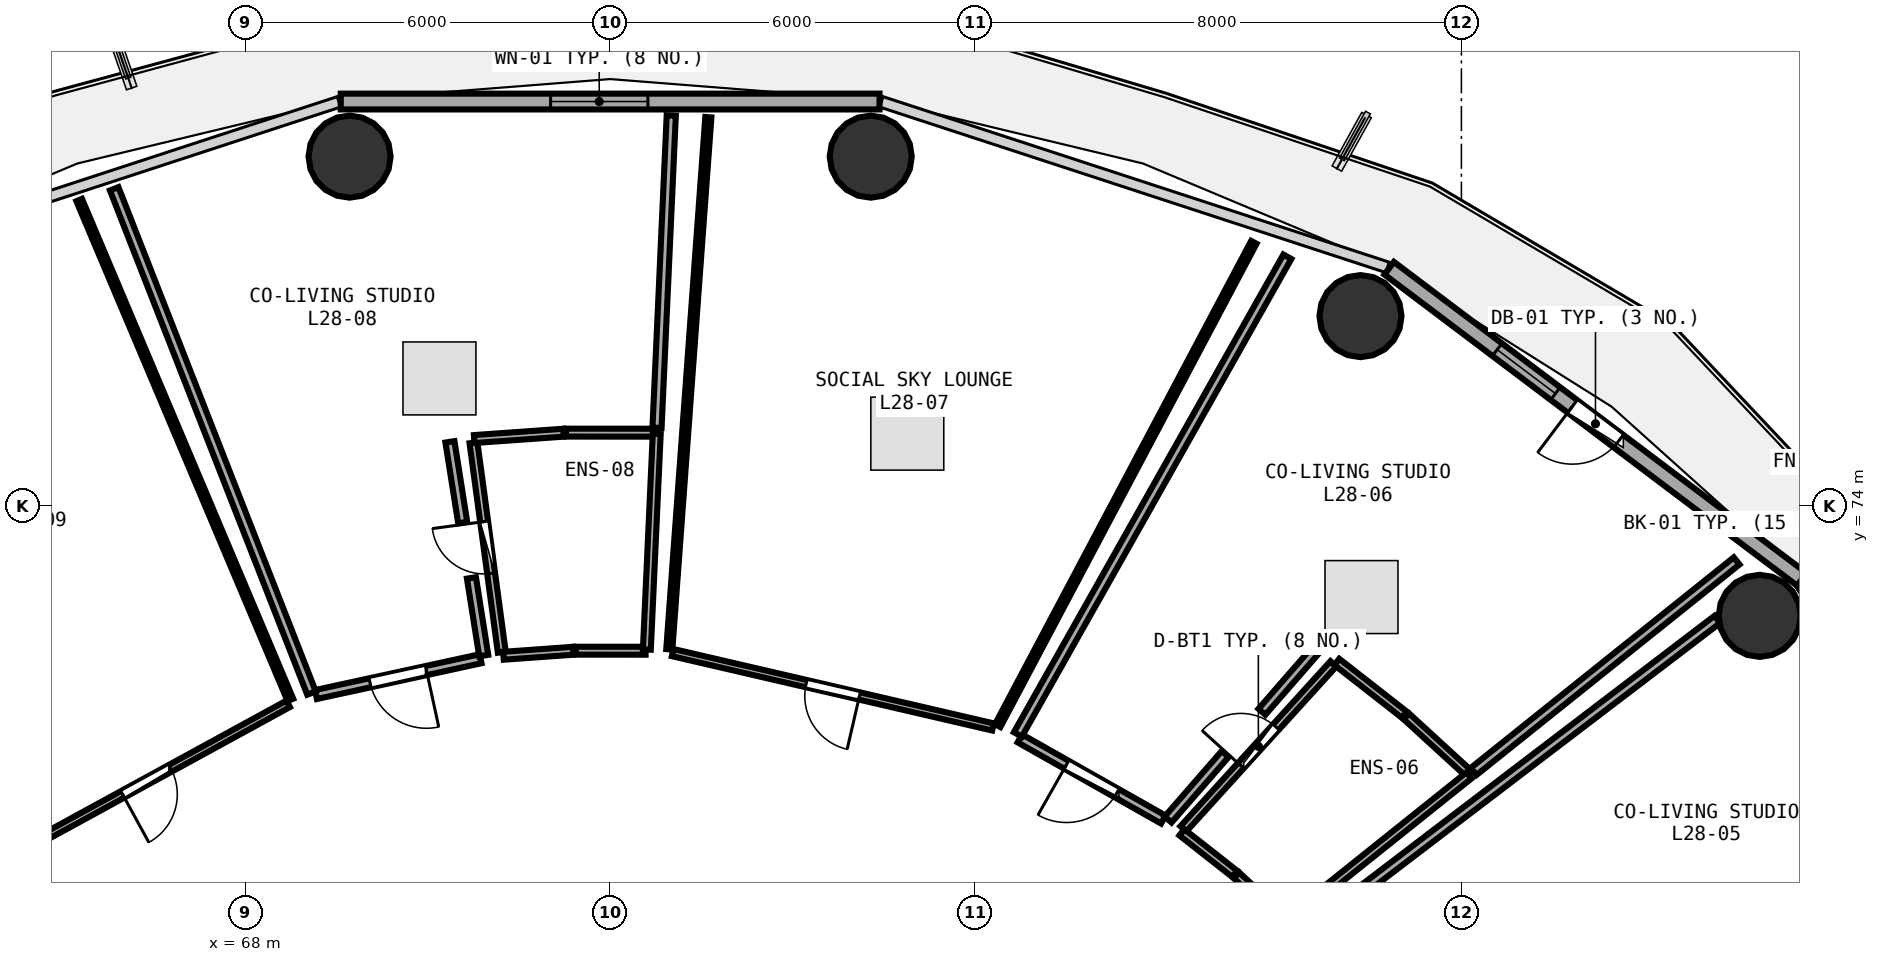
"""IFC4 building model, lengths in metres.
Left out: names, types, materials, properties, quantities, classifications, styles, units other than length and angle.
Written with IfcOpenShell. Run it as: python <this file> out.ifc"""

import sys

from ifc_helpers import new_model, si_unit, direction, frame, frame_2d, origin, origin_2d, place, context, subcontext, project, spatial, rectangle, circle, extrude, element, fill, save


model = new_model("IFC4")
c1 = context("Model", 3, precision=1e-05, world=origin(), true_north=direction((0.0, 1.0)))
c2 = subcontext(c1, "Body", "Model", "MODEL_VIEW")
j1 = project(units=[si_unit("LENGTHUNIT", "METRE"), si_unit("PLANEANGLEUNIT", "RADIAN")], contexts=[c1])
p1 = place(None, origin())
s1 = spatial("IfcSite", under=j1, at=p1, CompositionType="ELEMENT")
p2 = place(p1, origin())
s2 = spatial("IfcBuilding", under=s1, at=p2, CompositionType="ELEMENT")
p3 = place(p2, frame((0.0, 0.0, 110.1)))
s3 = spatial("IfcBuildingStorey", under=s2, at=p3, CompositionType="ELEMENT", Elevation=110.1)
for number, where, z_axis, x_axis in (
    (1, (92.906, 72.193, 0.0), (0.0, 0.0, 1.0), (1.0, 0.0, 0.0)),
    (2, (86.34, 77.122, 0.0), (0.0, 0.0, 1.0), (1.0, 0.0, 0.0)),
    (3, (78.286, 79.745, 0.0), (0.0, 0.0, 1.0), (1.0, 0.0, 0.0)),
    (4, (69.714, 79.745, 0.0), (0.0, 0.0, 1.0), (1.0, 0.0, 0.0)),
):
    element("IfcColumn", number, at=place(p3, frame(where, z_axis=z_axis, x_axis=x_axis)), inside=s3, PredefinedType="COLUMN", context=c2, shape_type="SweptSolid", body=[
        extrude(circle(Radius=0.675, at=origin_2d()), origin(), (0.0, 0.0, 1.0), 3.75),
    ])
p4 = place(p3, frame((98.048, 65.879, 0.0), z_axis=(0.0, 0.0, 1.0), x_axis=(-0.540620528459, 0.841266571432, 0.0)))
e5 = element("IfcWall", 5, at=p4, inside=s3, PredefinedType="SOLIDWALL", context=c2, shape_type="SweptSolid", body=[
    extrude(rectangle(XDim=8.193, YDim=0.26, at=frame_2d((4.096, 0.0))), origin(), (0.0, 0.0, 1.0), 3.475),
])
p5 = place(p4, frame((3.621, 0.0, 0.0)))
e6 = element("IfcOpeningElement", 6, at=p5, cuts=e5, PredefinedType="OPENING", context=c2, shape_type="SweptSolid", body=[
    extrude(rectangle(XDim=0.95, YDim=2.1, at=frame_2d((0.475, 1.05))), frame((0.0, 0.14, 0.0), z_axis=(0.0, -1.0, 0.0), x_axis=(1.0, 0.0, 0.0)), (0.0, 0.0, 1.0), 0.28),
])
p6 = place(p4, frame((4.921, 0.0, 0.85)))
e7 = element("IfcOpeningElement", 7, at=p6, cuts=e5, PredefinedType="OPENING", context=c2, shape_type="SweptSolid", body=[
    extrude(rectangle(XDim=1.2, YDim=1.45, at=frame_2d((0.6, 0.725))), frame((0.0, 0.14, 0.0), z_axis=(0.0, -1.0, 0.0), x_axis=(1.0, 0.0, 0.0)), (0.0, 0.0, 1.0), 0.28),
])
p7 = place(p3, frame((93.599, 72.793, 0.0), z_axis=(0.0, 0.0, 1.0), x_axis=(-0.798501507879, 0.601992808857, 0.0)))
e8 = element("IfcWall", 8, at=p7, inside=s3, PredefinedType="SOLIDWALL", context=c2, shape_type="SweptSolid", body=[
    extrude(rectangle(XDim=8.499, YDim=0.26, at=frame_2d((4.25, 0.0))), origin(), (0.0, 0.0, 1.0), 3.475),
])
p8 = place(p7, frame((3.775, 0.0, 0.0)))
e9 = element("IfcOpeningElement", 9, at=p8, cuts=e8, PredefinedType="OPENING", context=c2, shape_type="SweptSolid", body=[
    extrude(rectangle(XDim=0.95, YDim=2.1, at=frame_2d((0.475, 1.05))), frame((0.0, 0.14, 0.0), z_axis=(0.0, -1.0, 0.0), x_axis=(1.0, 0.0, 0.0)), (0.0, 0.0, 1.0), 0.28),
])
p9 = place(p7, frame((5.075, 0.0, 0.85)))
e10 = element("IfcOpeningElement", 10, at=p9, cuts=e8, PredefinedType="OPENING", context=c2, shape_type="SweptSolid", body=[
    extrude(rectangle(XDim=1.2, YDim=1.45, at=frame_2d((0.6, 0.725))), frame((0.0, 0.14, 0.0), z_axis=(0.0, -1.0, 0.0), x_axis=(1.0, 0.0, 0.0)), (0.0, 0.0, 1.0), 0.28),
])
p10 = place(p3, frame((78.43, 80.651, 0.0), z_axis=(0.0, 0.0, 1.0), x_axis=(-1.0, 0.0, 0.0)))
e11 = element("IfcWall", 11, at=p10, inside=s3, PredefinedType="SOLIDWALL", context=c2, shape_type="SweptSolid", body=[
    extrude(rectangle(XDim=8.861, YDim=0.26, at=frame_2d((4.43, 0.0))), origin(), (0.0, 0.0, 1.0), 3.475),
])
p11 = place(p10, frame((3.81, 0.0, 0.85)))
e12 = element("IfcOpeningElement", 12, at=p11, cuts=e11, PredefinedType="OPENING", context=c2, shape_type="SweptSolid", body=[
    extrude(rectangle(XDim=1.6, YDim=1.45, at=frame_2d((0.8, 0.725))), frame((0.0, 0.14, 0.0), z_axis=(0.0, -1.0, 0.0), x_axis=(1.0, 0.0, 0.0)), (0.0, 0.0, 1.0), 0.28),
])
p12 = place(p3, frame((83.427, 68.689, 0.0), z_axis=(0.0, 0.0, 1.0), x_axis=(0.672623095828, 0.739985250501, 0.0)))
e13 = element("IfcWall", 13, at=p12, inside=s3, PredefinedType="PLUMBINGWALL", context=c2, shape_type="SweptSolid", body=[
    extrude(rectangle(XDim=3.668, YDim=0.13, at=frame_2d((1.834, 0.0))), origin(), (0.0, 0.0, 1.0), 2.925),
])
p13 = place(p12, frame((1.404, 0.0, 0.0)))
e14 = element("IfcOpeningElement", 14, at=p13, cuts=e13, PredefinedType="OPENING", context=c2, shape_type="SweptSolid", body=[
    extrude(rectangle(XDim=0.86, YDim=2.05, at=frame_2d((0.43, 1.025))), frame((0.0, 0.075, 0.0), z_axis=(0.0, -1.0, 0.0), x_axis=(1.0, 0.0, 0.0)), (0.0, 0.0, 1.0), 0.15),
])
p14 = place(p3, frame((83.098, 68.843, 0.0), z_axis=(0.0, 0.0, 1.0), x_axis=(-0.870363179511, 0.492410332702, 0.0)))
e15 = element("IfcWall", 15, at=p14, inside=s3, PredefinedType="PARTITIONING", context=c2, shape_type="SweptSolid", body=[
    extrude(rectangle(XDim=2.711, YDim=0.15, at=frame_2d((1.355, 0.0))), origin(), (0.0, 0.0, 1.0), 2.925),
])
p15 = place(p14, frame((0.881, 0.0, 0.0)))
e16 = element("IfcOpeningElement", 16, at=p15, cuts=e15, PredefinedType="OPENING", context=c2, shape_type="SweptSolid", body=[
    extrude(rectangle(XDim=0.95, YDim=2.08, at=frame_2d((0.475, 1.04))), frame((0.0, 0.085, 0.0), z_axis=(0.0, -1.0, 0.0), x_axis=(1.0, 0.0, 0.0)), (0.0, 0.0, 1.0), 0.17),
])
p16 = place(p3, frame((80.297, 70.365, 0.0), z_axis=(0.0, 0.0, 1.0), x_axis=(-0.97410128396, 0.226112115082, 0.0)))
e17 = element("IfcWall", 17, at=p16, inside=s3, PredefinedType="PARTITIONING", context=c2, shape_type="SweptSolid", body=[
    extrude(rectangle(XDim=5.408, YDim=0.12, at=frame_2d((2.704, 0.0))), origin(), (0.0, 0.0, 1.0), 3.235),
])
p17 = place(p16, frame((2.254, 0.0, 0.0)))
e18 = element("IfcOpeningElement", 18, at=p17, cuts=e17, PredefinedType="OPENING", context=c2, shape_type="SweptSolid", body=[
    extrude(rectangle(XDim=0.9, YDim=2.08, at=frame_2d((0.45, 1.04))), frame((0.0, 0.07, 0.0), z_axis=(0.0, -1.0, 0.0), x_axis=(1.0, 0.0, 0.0)), (0.0, 0.0, 1.0), 0.14),
])
p18 = place(p3, frame((72.218, 71.594, 0.0), z_axis=(0.0, 0.0, 1.0), x_axis=(-0.134063285547, 0.990972772314, 0.0)))
e19 = element("IfcWall", 19, at=p18, inside=s3, PredefinedType="PLUMBINGWALL", context=c2, shape_type="SweptSolid", body=[
    extrude(rectangle(XDim=3.477, YDim=0.13, at=frame_2d((1.738, 0.0))), origin(), (0.0, 0.0, 1.0), 3.175),
])
p19 = place(p18, frame((1.308, 0.0, 0.0)))
e20 = element("IfcOpeningElement", 20, at=p19, cuts=e19, PredefinedType="OPENING", context=c2, shape_type="SweptSolid", body=[
    extrude(rectangle(XDim=0.86, YDim=2.05, at=frame_2d((0.43, 1.025))), frame((0.0, 0.075, 0.0), z_axis=(0.0, -1.0, 0.0), x_axis=(1.0, 0.0, 0.0)), (0.0, 0.0, 1.0), 0.15),
])
p20 = place(p3, frame((71.868, 71.487, 0.0), z_axis=(0.0, 0.0, 1.0), x_axis=(-0.977162043607, -0.212495507093, 0.0)))
e21 = element("IfcWall", 21, at=p20, inside=s3, PredefinedType="PARTITIONING", context=c2, shape_type="SweptSolid", body=[
    extrude(rectangle(XDim=2.77, YDim=0.15, at=frame_2d((1.385, 0.0))), origin(), (0.0, 0.0, 1.0), 2.925),
])
p21 = place(p20, frame((0.91, 0.0, 0.0)))
e22 = element("IfcOpeningElement", 22, at=p21, cuts=e21, PredefinedType="OPENING", context=c2, shape_type="SweptSolid", body=[
    extrude(rectangle(XDim=0.95, YDim=2.08, at=frame_2d((0.475, 1.04))), frame((0.0, 0.085, 0.0), z_axis=(0.0, -1.0, 0.0), x_axis=(1.0, 0.0, 0.0)), (0.0, 0.0, 1.0), 0.17),
])
p22 = place(p3, frame((68.704, 70.745, 0.0), z_axis=(0.0, 0.0, 1.0), x_axis=(-0.877504886901, -0.479567694351, 0.0)))
e23 = element("IfcWall", 23, at=p22, inside=s3, PredefinedType="PARTITIONING", context=c2, shape_type="SweptSolid", body=[
    extrude(rectangle(XDim=5.306, YDim=0.12, at=frame_2d((2.653, 0.0))), origin(), (0.0, 0.0, 1.0), 2.925),
])
p23 = place(p22, frame((2.203, 0.0, 0.0)))
e24 = element("IfcOpeningElement", 24, at=p23, cuts=e23, PredefinedType="OPENING", context=c2, shape_type="SweptSolid", body=[
    extrude(rectangle(XDim=0.9, YDim=2.08, at=frame_2d((0.45, 1.04))), frame((0.0, 0.07, 0.0), z_axis=(0.0, -1.0, 0.0), x_axis=(1.0, 0.0, 0.0)), (0.0, 0.0, 1.0), 0.14),
])
p24 = place(p3, frame((85.397, 66.943, 0.0), z_axis=(0.0, 0.0, 1.0), x_axis=(0.795402924784, 0.606081007165, 0.0)))
e25 = element("IfcWall", 25, at=p24, inside=s3, PredefinedType="PARTITIONING", context=c2, shape_type="SweptSolid", body=[
    extrude(rectangle(XDim=8.564, YDim=0.15, at=frame_2d((4.282, 0.0))), origin(), (0.0, 0.0, 1.0), 2.925),
])
p25 = place(p3, frame((85.107, 67.182, 0.0), z_axis=(0.0, 0.0, 1.0), x_axis=(-0.735264550173, 0.677780230796, 0.0)))
e26 = element("IfcWall", 26, at=p25, inside=s3, PredefinedType="PLUMBINGWALL", context=c2, shape_type="SweptSolid", body=[
    extrude(rectangle(XDim=1.096, YDim=0.13, at=frame_2d((0.548, 0.0))), origin(), (0.0, 0.0, 1.0), 2.925),
])
p26 = place(p3, frame((84.271, 67.95, 0.0), z_axis=(0.0, 0.0, 1.0), x_axis=(-0.786487058699, 0.617606757168, 0.0)))
e27 = element("IfcWall", 27, at=p26, inside=s3, PredefinedType="PLUMBINGWALL", context=c2, shape_type="SweptSolid", body=[
    extrude(rectangle(XDim=1.104, YDim=0.13, at=frame_2d((0.552, 0.0))), origin(), (0.0, 0.0, 1.0), 2.925),
])
p27 = place(p3, frame((85.951, 71.436, 0.0), z_axis=(0.0, 0.0, 1.0), x_axis=(0.787953589467, -0.615734635087, 0.0)))
e28 = element("IfcWall", 28, at=p27, inside=s3, PredefinedType="PLUMBINGWALL", context=c2, shape_type="SweptSolid", body=[
    extrude(rectangle(XDim=1.412, YDim=0.13, at=frame_2d((0.706, 0.0))), origin(), (0.0, 0.0, 1.0), 3.175),
])
p28 = place(p3, frame((87.094, 70.541, 0.0), z_axis=(0.0, 0.0, 1.0), x_axis=(0.737639046397, -0.675195258596, 0.0)))
e29 = element("IfcWall", 29, at=p28, inside=s3, PredefinedType="PLUMBINGWALL", context=c2, shape_type="SweptSolid", body=[
    extrude(rectangle(XDim=1.4, YDim=0.13, at=frame_2d((0.7, 0.0))), origin(), (0.0, 0.0, 1.0), 3.175),
])
p29 = place(p3, frame((88.125, 69.57, 0.0), z_axis=(0.0, 0.0, 1.0), x_axis=(-0.781005766081, -0.624523813276, 0.0)))
e30 = element("IfcWall", 30, at=p29, inside=s3, PredefinedType="PLUMBINGWALL", context=c2, shape_type="SweptSolid", body=[
    extrude(rectangle(XDim=3.826, YDim=0.13, at=frame_2d((1.913, 0.0))), origin(), (0.0, 0.0, 1.0), 2.925),
])
p30 = place(p3, frame((80.706, 70.242, 0.0), z_axis=(0.0, 0.0, 1.0), x_axis=(0.491283806378, 0.870999553152, 0.0)))
e31 = element("IfcWall", 31, at=p30, inside=s3, PredefinedType="PARTITIONING", context=c2, shape_type="SweptSolid", body=[
    extrude(rectangle(XDim=9.02, YDim=0.15, at=frame_2d((4.51, 0.0))), origin(), (0.0, 0.0, 1.0), 2.925),
])
p31 = place(p3, frame((92.527, 73.096, 0.0), z_axis=(0.0, 0.0, 1.0), x_axis=(-0.780748421531, -0.624845502726, 0.0)))
e32 = element("IfcWall", 32, at=p31, inside=s3, PredefinedType="PARTITIONING", context=c2, shape_type="SweptSolid", body=[
    extrude(rectangle(XDim=5.541, YDim=0.15, at=frame_2d((2.77, 0.0))), origin(), (0.0, 0.0, 1.0), 2.975),
])
p32 = place(p3, frame((85.632, 71.662, 0.0), z_axis=(0.0, 0.0, 1.0), x_axis=(-0.656722687954, -0.7541321576, 0.0)))
e33 = element("IfcWall", 33, at=p32, inside=s3, PredefinedType="PARTITIONING", context=c2, shape_type="SweptSolid", body=[
    extrude(rectangle(XDim=1.388, YDim=0.15, at=frame_2d((0.694, 0.0))), origin(), (0.0, 0.0, 1.0), 3.175),
])
p33 = place(p3, frame((84.115, 69.921, 0.0), z_axis=(0.0, 0.0, 1.0), x_axis=(-0.656931124452, -0.75395059369, 0.0)))
e34 = element("IfcWall", 34, at=p33, inside=s3, PredefinedType="PARTITIONING", context=c2, shape_type="SweptSolid", body=[
    extrude(rectangle(XDim=1.429, YDim=0.15, at=frame_2d((0.715, 0.0))), origin(), (0.0, 0.0, 1.0), 2.925),
])
p34 = place(p3, frame((74.973, 71.642, 0.0), z_axis=(0.0, 0.0, 1.0), x_axis=(0.073174761374, 0.997319133627, 0.0)))
e35 = element("IfcWall", 35, at=p34, inside=s3, PredefinedType="PARTITIONING", context=c2, shape_type="SweptSolid", body=[
    extrude(rectangle(XDim=8.775, YDim=0.1, at=frame_2d((4.387, 0.0))), origin(), (0.0, 0.0, 1.0), 2.975),
])
p35 = place(p3, frame((84.586, 78.336, 0.0), z_axis=(0.0, 0.0, 1.0), x_axis=(-0.468267999336, -0.883586487446, 0.0)))
e36 = element("IfcWall", 36, at=p35, inside=s3, PredefinedType="PARTITIONING", context=c2, shape_type="SweptSolid", body=[
    extrude(rectangle(XDim=8.996, YDim=0.1, at=frame_2d((4.498, 0.0))), origin(), (0.0, 0.0, 1.0), 2.925),
])
p36 = place(p3, frame((74.583, 71.619, 0.0), z_axis=(0.0, 0.0, 1.0), x_axis=(-0.999999436534, 0.001061570527, 0.0)))
e37 = element("IfcWall", 37, at=p36, inside=s3, PredefinedType="PLUMBINGWALL", context=c2, shape_type="SweptSolid", body=[
    extrude(rectangle(XDim=1.15, YDim=0.13, at=frame_2d((0.575, 0.0))), origin(), (0.0, 0.0, 1.0), 3.48),
])
p37 = place(p3, frame((73.393, 71.619, 0.0), z_axis=(0.0, 0.0, 1.0), x_axis=(-0.997438186292, -0.071533660094, 0.0)))
e38 = element("IfcWall", 38, at=p37, inside=s3, PredefinedType="PLUMBINGWALL", context=c2, shape_type="SweptSolid", body=[
    extrude(rectangle(XDim=1.15, YDim=0.13, at=frame_2d((0.575, 0.0))), origin(), (0.0, 0.0, 1.0), 3.48),
])
p38 = place(p3, frame((71.764, 75.1, 0.0), z_axis=(0.0, 0.0, 1.0), x_axis=(0.997492243664, 0.070775870396, 0.0)))
e39 = element("IfcWall", 39, at=p38, inside=s3, PredefinedType="PLUMBINGWALL", context=c2, shape_type="SweptSolid", body=[
    extrude(rectangle(XDim=1.473, YDim=0.13, at=frame_2d((0.736, 0.0))), origin(), (0.0, 0.0, 1.0), 3.48),
])
p39 = place(p3, frame((73.273, 75.206, 0.0), z_axis=(0.0, 0.0, 1.0), x_axis=(0.999999780566, -0.000662470872, 0.0)))
e40 = element("IfcWall", 40, at=p39, inside=s3, PredefinedType="PLUMBINGWALL", context=c2, shape_type="SweptSolid", body=[
    extrude(rectangle(XDim=1.474, YDim=0.13, at=frame_2d((0.737, 0.0))), origin(), (0.0, 0.0, 1.0), 3.48),
])
p40 = place(p3, frame((74.766, 75.185, 0.0), z_axis=(0.0, 0.0, 1.0), x_axis=(-0.045666593687, -0.998956736912, 0.0)))
e41 = element("IfcWall", 41, at=p40, inside=s3, PredefinedType="PLUMBINGWALL", context=c2, shape_type="SweptSolid", body=[
    extrude(rectangle(XDim=3.55, YDim=0.13, at=frame_2d((1.775, 0.0))), origin(), (0.0, 0.0, 1.0), 3.175),
])
p41 = place(p3, frame((69.088, 70.923, 0.0), z_axis=(0.0, 0.0, 1.0), x_axis=(-0.364389011294, 0.931246824665, 0.0)))
e42 = element("IfcWall", 42, at=p41, inside=s3, PredefinedType="PARTITIONING", context=c2, shape_type="SweptSolid", body=[
    extrude(rectangle(XDim=8.905, YDim=0.15, at=frame_2d((4.453, 0.0))), origin(), (0.0, 0.0, 1.0), 2.975),
])
p42 = place(p3, frame((75.005, 80.422, 0.0), z_axis=(0.0, 0.0, 1.0), x_axis=(-0.045575632324, -0.998960890995, 0.0)))
e43 = element("IfcWall", 43, at=p42, inside=s3, PredefinedType="PARTITIONING", context=c2, shape_type="SweptSolid", body=[
    extrude(rectangle(XDim=5.143, YDim=0.15, at=frame_2d((2.571, 0.0))), origin(), (0.0, 0.0, 1.0), 2.975),
])
p43 = place(p3, frame((71.365, 75.054, 0.0), z_axis=(0.0, 0.0, 1.0), x_axis=(0.156065079238, -0.987746774757, 0.0)))
e44 = element("IfcWall", 44, at=p43, inside=s3, PredefinedType="PARTITIONING", context=c2, shape_type="SweptSolid", body=[
    extrude(rectangle(XDim=1.345, YDim=0.15, at=frame_2d((0.673, 0.0))), origin(), (0.0, 0.0, 1.0), 3.175),
])
p44 = place(p3, frame((71.719, 72.817, 0.0), z_axis=(0.0, 0.0, 1.0), x_axis=(0.156156496637, -0.987732326371, 0.0)))
e45 = element("IfcWall", 45, at=p44, inside=s3, PredefinedType="PARTITIONING", context=c2, shape_type="SweptSolid", body=[
    extrude(rectangle(XDim=1.293, YDim=0.15, at=frame_2d((0.646, 0.0))), origin(), (0.0, 0.0, 1.0), 3.48),
])
p45 = place(p3, frame((65.268, 79.031, 0.0), z_axis=(0.0, 0.0, 1.0), x_axis=(0.389258885466, -0.921128395006, 0.0)))
e46 = element("IfcWall", 46, at=p45, inside=s3, PredefinedType="PARTITIONING", context=c2, shape_type="SweptSolid", body=[
    extrude(rectangle(XDim=8.924, YDim=0.1, at=frame_2d((4.462, 0.0))), origin(), (0.0, 0.0, 1.0), 2.975),
])
p46 = place(p8, frame((0.95, 0.0, 0.0), z_axis=(0.0, 0.0, 1.0), x_axis=(-1.0, 0.0, 0.0)))
e47 = element("IfcDoor", 47, at=p46, inside=s3, OperationType="SINGLE_SWING_LEFT", PredefinedType="DOOR", context=c2, shape_type="SweptSolid", body=[
    extrude(rectangle(XDim=0.95, YDim=2.1, at=frame_2d((0.475, 1.05))), frame((0.0, 0.025, 0.0), z_axis=(0.0, -1.0, 0.0), x_axis=(1.0, 0.0, 0.0)), (0.0, 0.0, 1.0), 0.05),
])
fill(e9, e47)
p47 = place(p9, origin())
e48 = element("IfcWindow", 48, at=p47, inside=s3, PartitioningType="SINGLE_PANEL", PredefinedType="WINDOW", context=c2, shape_type="SweptSolid", body=[
    extrude(rectangle(XDim=1.2, YDim=1.45, at=frame_2d((0.6, 0.725))), frame((0.0, 0.03, 0.0), z_axis=(0.0, -1.0, 0.0), x_axis=(1.0, 0.0, 0.0)), (0.0, 0.0, 1.0), 0.06),
])
fill(e10, e48)
p48 = place(p11, origin())
e49 = element("IfcWindow", 49, at=p48, inside=s3, PartitioningType="SINGLE_PANEL", PredefinedType="WINDOW", context=c2, shape_type="SweptSolid", body=[
    extrude(rectangle(XDim=1.6, YDim=1.45, at=frame_2d((0.8, 0.725))), frame((0.0, 0.03, 0.0), z_axis=(0.0, -1.0, 0.0), x_axis=(1.0, 0.0, 0.0)), (0.0, 0.0, 1.0), 0.06),
])
fill(e12, e49)
p49 = place(p13, origin())
e50 = element("IfcDoor", 50, at=p49, inside=s3, OperationType="SINGLE_SWING_LEFT", PredefinedType="DOOR", context=c2, shape_type="SweptSolid", body=[
    extrude(rectangle(XDim=0.86, YDim=2.05, at=frame_2d((0.43, 1.025))), frame((0.0, 0.025, 0.0), z_axis=(0.0, -1.0, 0.0), x_axis=(1.0, 0.0, 0.0)), (0.0, 0.0, 1.0), 0.05),
])
fill(e14, e50)
p50 = place(p15, origin())
e51 = element("IfcDoor", 51, at=p50, inside=s3, OperationType="SINGLE_SWING_RIGHT", PredefinedType="DOOR", context=c2, shape_type="SweptSolid", body=[
    extrude(rectangle(XDim=0.95, YDim=2.08, at=frame_2d((0.475, 1.04))), frame((0.0, 0.025, 0.0), z_axis=(0.0, -1.0, 0.0), x_axis=(1.0, 0.0, 0.0)), (0.0, 0.0, 1.0), 0.05),
])
fill(e16, e51)
p51 = place(p17, origin())
e52 = element("IfcDoor", 52, at=p51, inside=s3, OperationType="SINGLE_SWING_LEFT", PredefinedType="DOOR", context=c2, shape_type="SweptSolid", body=[
    extrude(rectangle(XDim=0.9, YDim=2.08, at=frame_2d((0.45, 1.04))), frame((0.0, 0.025, 0.0), z_axis=(0.0, -1.0, 0.0), x_axis=(1.0, 0.0, 0.0)), (0.0, 0.0, 1.0), 0.05),
])
fill(e18, e52)
p52 = place(p19, origin())
e53 = element("IfcDoor", 53, at=p52, inside=s3, OperationType="SINGLE_SWING_RIGHT", PredefinedType="DOOR", context=c2, shape_type="SweptSolid", body=[
    extrude(rectangle(XDim=0.86, YDim=2.05, at=frame_2d((0.43, 1.025))), frame((0.0, 0.025, 0.0), z_axis=(0.0, -1.0, 0.0), x_axis=(1.0, 0.0, 0.0)), (0.0, 0.0, 1.0), 0.05),
])
fill(e20, e53)
p53 = place(p21, origin())
e54 = element("IfcDoor", 54, at=p53, inside=s3, OperationType="SINGLE_SWING_LEFT", PredefinedType="DOOR", context=c2, shape_type="SweptSolid", body=[
    extrude(rectangle(XDim=0.95, YDim=2.08, at=frame_2d((0.475, 1.04))), frame((0.0, 0.025, 0.0), z_axis=(0.0, -1.0, 0.0), x_axis=(1.0, 0.0, 0.0)), (0.0, 0.0, 1.0), 0.05),
])
fill(e22, e54)
p54 = place(p23, origin())
e55 = element("IfcDoor", 55, at=p54, inside=s3, OperationType="SINGLE_SWING_RIGHT", PredefinedType="DOOR", context=c2, shape_type="SweptSolid", body=[
    extrude(rectangle(XDim=0.9, YDim=2.08, at=frame_2d((0.45, 1.04))), frame((0.0, 0.025, 0.0), z_axis=(0.0, -1.0, 0.0), x_axis=(1.0, 0.0, 0.0)), (0.0, 0.0, 1.0), 0.05),
])
fill(e24, e55)
save(model, sys.argv[1])
